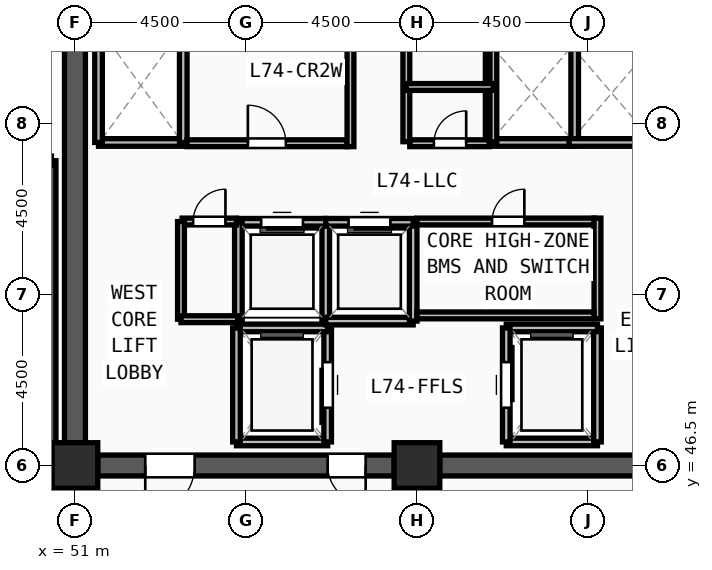
"""IFC4 building model, lengths in metres.
Left out: names, types, materials, properties, quantities, classifications, styles, units other than length and angle.
Written with IfcOpenShell. Run it as: python <this file> out.ifc"""

import sys

from ifc_helpers import new_model, si_unit, direction, frame, frame_2d, origin, origin_2d, place, context, subcontext, project, spatial, rectangle, extrude, source, transform, mapped, element, fill, save


model = new_model("IFC4")
c1 = context("Model", 3, precision=1e-05, world=origin(), true_north=direction((0.0, 1.0)))
c2 = subcontext(c1, "Body", "Model", "MODEL_VIEW")
j1 = project(units=[si_unit("LENGTHUNIT", "METRE"), si_unit("PLANEANGLEUNIT", "RADIAN")], contexts=[c1])
p1 = place(None, origin())
s1 = spatial("IfcSite", under=j1, at=p1, CompositionType="ELEMENT")
p2 = place(p1, origin())
s2 = spatial("IfcBuilding", under=s1, at=p2, CompositionType="ELEMENT")
p3 = place(p2, frame((0.0, 0.0, 286.5)))
s3 = spatial("IfcBuildingStorey", under=s2, at=p3, CompositionType="ELEMENT", Elevation=286.5)
m1 = source(origin(), c2, "Body", "SweptSolid", [
    extrude(rectangle(XDim=1.2, YDim=1.2, at=origin_2d()), origin(), (0.0, 0.0, 1.0), 3.75),
])
for number, where, z_axis, x_axis in (
    (1, (51.0, 46.5, 0.0), (0.0, 0.0, 1.0), (1.0, 0.0, 0.0)),
    (2, (60.0, 46.5, 0.0), (0.0, 0.0, 1.0), (1.0, 0.0, 0.0)),
):
    element("IfcColumn", number, at=place(p3, frame(where, z_axis=z_axis, x_axis=x_axis)), inside=s3, PredefinedType="COLUMN", context=c2, shape_type="MappedRepresentation", body=[
        mapped(m1, transform((0.0, 0.0, 0.0), x_axis=(1.0, 0.0, 0.0), y_axis=(0.0, 1.0, 0.0), z_axis=(0.0, 0.0, 1.0), scale=1.0)),
    ])
p4 = place(p3, frame((68.4, 46.5, 0.0), z_axis=(0.0, 0.0, 1.0), x_axis=(-1.0, 0.0, 0.0)))
e3 = element("IfcWall", 3, at=p4, inside=s3, PredefinedType="SHEAR", context=c2, shape_type="SweptSolid", body=[
    extrude(rectangle(XDim=7.8, YDim=0.55, at=frame_2d((3.9, 0.0))), origin(), (0.0, 0.0, 1.0), 3.57),
])
m2 = source(origin(), c2, "Body", "SweptSolid", [
    extrude(rectangle(XDim=1.3, YDim=2.2, at=frame_2d((0.65, 1.1))), frame((0.0, 0.285, 0.0), z_axis=(0.0, -1.0, 0.0), x_axis=(1.0, 0.0, 0.0)), (0.0, 0.0, 1.0), 0.57),
])
p5 = place(p4, frame((1.25, 0.0, 0.0)))
e4 = element("IfcOpeningElement", 4, at=p5, cuts=e3, PredefinedType="OPENING", context=c2, shape_type="MappedRepresentation", body=[
    mapped(m2, transform((0.0, 0.0, 0.0), x_axis=(1.0, 0.0, 0.0), y_axis=(0.0, 1.0, 0.0), z_axis=(0.0, 0.0, 1.0), scale=1.0)),
])
p6 = place(p3, frame((59.4, 46.5, 0.0), z_axis=(0.0, 0.0, 1.0), x_axis=(-1.0, 0.0, 0.0)))
e5 = element("IfcWall", 5, at=p6, inside=s3, PredefinedType="SHEAR", context=c2, shape_type="SweptSolid", body=[
    extrude(rectangle(XDim=7.8, YDim=0.55, at=frame_2d((3.9, 0.0))), origin(), (0.0, 0.0, 1.0), 3.57),
])
p7 = place(p6, frame((5.25, 0.0, 0.0)))
e6 = element("IfcOpeningElement", 6, at=p7, cuts=e5, PredefinedType="OPENING", context=c2, shape_type="MappedRepresentation", body=[
    mapped(m2, transform((0.0, 0.0, 0.0), x_axis=(1.0, 0.0, 0.0), y_axis=(0.0, 1.0, 0.0), z_axis=(0.0, 0.0, 1.0), scale=1.0)),
])
m3 = source(origin(), c2, "Body", "SweptSolid", [
    extrude(rectangle(XDim=1.0, YDim=2.2, at=frame_2d((0.5, 1.1))), frame((0.0, 0.285, 0.0), z_axis=(0.0, -1.0, 0.0), x_axis=(1.0, 0.0, 0.0)), (0.0, 0.0, 1.0), 0.57),
])
p8 = place(p6, frame((0.75, 0.0, 0.0)))
e7 = element("IfcOpeningElement", 7, at=p8, cuts=e5, PredefinedType="OPENING", context=c2, shape_type="MappedRepresentation", body=[
    mapped(m3, transform((0.0, 0.0, 0.0), x_axis=(1.0, 0.0, 0.0), y_axis=(0.0, 1.0, 0.0), z_axis=(0.0, 0.0, 1.0), scale=1.0)),
])
p9 = place(p3, frame((51.0, 47.1, 0.0), z_axis=(0.0, 0.0, 1.0), x_axis=(0.0, 1.0, 0.0)))
e8 = element("IfcWall", 8, at=p9, inside=s3, PredefinedType="SHEAR", context=c2, shape_type="SweptSolid", body=[
    extrude(rectangle(XDim=13.8, YDim=0.55, at=frame_2d((6.9, 0.0))), origin(), (0.0, 0.0, 1.0), 3.57),
])
p10 = place(p3, frame((50.38, 46.7, 0.0), z_axis=(0.0, 0.0, 1.0), x_axis=(0.0, 1.0, 0.0)))
e9 = element("IfcWall", 9, at=p10, inside=s3, PredefinedType="SOLIDWALL", context=c2, shape_type="SweptSolid", body=[
    extrude(rectangle(XDim=7.82, YDim=0.24, at=frame_2d((3.91, 0.0))), origin(), (0.0, 0.0, 1.0), 3.57),
])
p11 = place(p3, frame((55.25, 47.12, 0.0), z_axis=(0.0, 0.0, 1.0), x_axis=(1.0, 0.0, 0.0)))
e10 = element("IfcWall", 10, at=p11, inside=s3, PredefinedType="SOLIDWALL", context=c2, shape_type="SweptSolid", body=[
    extrude(rectangle(XDim=2.4, YDim=0.2, at=frame_2d((1.2, 0.0))), origin(), (0.0, 0.0, 1.0), 3.57),
])
p12 = place(p3, frame((57.65, 47.12, 0.0), z_axis=(0.0, 0.0, 1.0), x_axis=(0.0, 1.0, 0.0)))
e11 = element("IfcWall", 11, at=p12, inside=s3, PredefinedType="SOLIDWALL", context=c2, shape_type="SweptSolid", body=[
    extrude(rectangle(XDim=3.0, YDim=0.2, at=frame_2d((1.5, 0.0))), origin(), (0.0, 0.0, 1.0), 3.57),
])
m4 = source(origin(), c2, "Body", "SweptSolid", [
    extrude(rectangle(XDim=1.2, YDim=2.3, at=frame_2d((0.6, 1.15))), frame((0.0, 0.11, 0.0), z_axis=(0.0, -1.0, 0.0), x_axis=(1.0, 0.0, 0.0)), (0.0, 0.0, 1.0), 0.22),
])
p13 = place(p12, frame((0.9, 0.0, 0.0)))
e12 = element("IfcOpeningElement", 12, at=p13, cuts=e11, PredefinedType="OPENING", context=c2, shape_type="MappedRepresentation", body=[
    mapped(m4, transform((0.0, 0.0, 0.0), x_axis=(1.0, 0.0, 0.0), y_axis=(0.0, 1.0, 0.0), z_axis=(0.0, 0.0, 1.0), scale=1.0)),
])
p14 = place(p3, frame((57.65, 50.12, 0.0), z_axis=(0.0, 0.0, 1.0), x_axis=(-1.0, 0.0, 0.0)))
e13 = element("IfcWall", 13, at=p14, inside=s3, PredefinedType="SOLIDWALL", context=c2, shape_type="SweptSolid", body=[
    extrude(rectangle(XDim=2.4, YDim=0.2, at=frame_2d((1.2, 0.0))), origin(), (0.0, 0.0, 1.0), 3.57),
])
p15 = place(p3, frame((55.25, 50.12, 0.0), z_axis=(0.0, 0.0, 1.0), x_axis=(0.0, -1.0, 0.0)))
e14 = element("IfcWall", 14, at=p15, inside=s3, PredefinedType="SOLIDWALL", context=c2, shape_type="SweptSolid", body=[
    extrude(rectangle(XDim=3.0, YDim=0.2, at=frame_2d((1.5, 0.0))), origin(), (0.0, 0.0, 1.0), 3.57),
])
p16 = place(p3, frame((62.35, 47.12, 0.0), z_axis=(0.0, 0.0, 1.0), x_axis=(1.0, 0.0, 0.0)))
e15 = element("IfcWall", 15, at=p16, inside=s3, PredefinedType="SOLIDWALL", context=c2, shape_type="SweptSolid", body=[
    extrude(rectangle(XDim=2.4, YDim=0.2, at=frame_2d((1.2, 0.0))), origin(), (0.0, 0.0, 1.0), 3.57),
])
p17 = place(p3, frame((64.75, 47.12, 0.0), z_axis=(0.0, 0.0, 1.0), x_axis=(0.0, 1.0, 0.0)))
e16 = element("IfcWall", 16, at=p17, inside=s3, PredefinedType="SOLIDWALL", context=c2, shape_type="SweptSolid", body=[
    extrude(rectangle(XDim=3.0, YDim=0.2, at=frame_2d((1.5, 0.0))), origin(), (0.0, 0.0, 1.0), 3.57),
])
p18 = place(p3, frame((64.75, 50.12, 0.0), z_axis=(0.0, 0.0, 1.0), x_axis=(-1.0, 0.0, 0.0)))
e17 = element("IfcWall", 17, at=p18, inside=s3, PredefinedType="SOLIDWALL", context=c2, shape_type="SweptSolid", body=[
    extrude(rectangle(XDim=2.4, YDim=0.2, at=frame_2d((1.2, 0.0))), origin(), (0.0, 0.0, 1.0), 3.57),
])
p19 = place(p3, frame((62.35, 50.12, 0.0), z_axis=(0.0, 0.0, 1.0), x_axis=(0.0, -1.0, 0.0)))
e18 = element("IfcWall", 18, at=p19, inside=s3, PredefinedType="SOLIDWALL", context=c2, shape_type="SweptSolid", body=[
    extrude(rectangle(XDim=3.0, YDim=0.2, at=frame_2d((1.5, 0.0))), origin(), (0.0, 0.0, 1.0), 3.57),
])
p20 = place(p19, frame((0.9, 0.0, 0.0)))
e19 = element("IfcOpeningElement", 19, at=p20, cuts=e18, PredefinedType="OPENING", context=c2, shape_type="MappedRepresentation", body=[
    mapped(m4, transform((0.0, 0.0, 0.0), x_axis=(1.0, 0.0, 0.0), y_axis=(0.0, 1.0, 0.0), z_axis=(0.0, 0.0, 1.0), scale=1.0)),
])
p21 = place(p3, frame((51.62, 55.0, 0.0), z_axis=(0.0, 0.0, 1.0), x_axis=(1.0, 0.0, 0.0)))
e20 = element("IfcWall", 20, at=p21, inside=s3, PredefinedType="SOLIDWALL", context=c2, shape_type="SweptSolid", body=[
    extrude(rectangle(XDim=2.23, YDim=0.2, at=frame_2d((1.115, 0.0))), origin(), (0.0, 0.0, 1.0), 3.57),
])
for number, where, z_axis, x_axis in (
    (21, (53.85, 55.0, 0.0), (0.0, 0.0, 1.0), (0.0, 1.0, 0.0)),
    (22, (51.62, 58.0, 0.0), (0.0, 0.0, 1.0), (0.0, -1.0, 0.0)),
):
    element("IfcWall", number, at=place(p3, frame(where, z_axis=z_axis, x_axis=x_axis)), inside=s3, PredefinedType="SOLIDWALL", context=c2, shape_type="SweptSolid", body=[
        extrude(rectangle(XDim=3.0, YDim=0.2, at=frame_2d((1.5, 0.0))), origin(), (0.0, 0.0, 1.0), 3.57),
    ])
p22 = place(p3, frame((61.9, 55.0, 0.0), z_axis=(0.0, 0.0, 1.0), x_axis=(1.0, 0.0, 0.0)))
e23 = element("IfcWall", 23, at=p22, inside=s3, PredefinedType="SOLIDWALL", context=c2, shape_type="SweptSolid", body=[
    extrude(rectangle(XDim=2.25, YDim=0.2, at=frame_2d((1.125, 0.0))), origin(), (0.0, 0.0, 1.0), 3.57),
])
for number, where, z_axis, x_axis in (
    (24, (64.15, 55.0, 0.0), (0.0, 0.0, 1.0), (0.0, 1.0, 0.0)),
    (25, (61.9, 57.6, 0.0), (0.0, 0.0, 1.0), (0.0, -1.0, 0.0)),
):
    element("IfcWall", number, at=place(p3, frame(where, z_axis=z_axis, x_axis=x_axis)), inside=s3, PredefinedType="SOLIDWALL", context=c2, shape_type="SweptSolid", body=[
        extrude(rectangle(XDim=2.6, YDim=0.2, at=frame_2d((1.3, 0.0))), origin(), (0.0, 0.0, 1.0), 3.57),
    ])
p23 = place(p3, frame((64.0, 55.0, 0.0), z_axis=(0.0, 0.0, 1.0), x_axis=(1.0, 0.0, 0.0)))
e26 = element("IfcWall", 26, at=p23, inside=s3, PredefinedType="SOLIDWALL", context=c2, shape_type="SweptSolid", body=[
    extrude(rectangle(XDim=2.25, YDim=0.2, at=frame_2d((1.125, 0.0))), origin(), (0.0, 0.0, 1.0), 3.57),
])
p24 = place(p3, frame((57.6, 50.3, 0.0), z_axis=(0.0, 0.0, 1.0), x_axis=(0.0, 1.0, 0.0)))
e27 = element("IfcWall", 27, at=p24, inside=s3, PredefinedType="SOLIDWALL", context=c2, shape_type="SweptSolid", body=[
    extrude(rectangle(XDim=2.6, YDim=0.2, at=frame_2d((1.3, 0.0))), origin(), (0.0, 0.0, 1.0), 3.57),
])
p25 = place(p3, frame((57.6, 52.9, 0.0), z_axis=(0.0, 0.0, 1.0), x_axis=(-1.0, 0.0, 0.0)))
e28 = element("IfcWall", 28, at=p25, inside=s3, PredefinedType="SOLIDWALL", context=c2, shape_type="SweptSolid", body=[
    extrude(rectangle(XDim=2.3, YDim=0.2, at=frame_2d((1.15, 0.0))), origin(), (0.0, 0.0, 1.0), 3.57),
])
m5 = source(origin(), c2, "Body", "SweptSolid", [
    extrude(rectangle(XDim=1.1, YDim=2.2, at=frame_2d((0.55, 1.1))), frame((0.0, 0.11, 0.0), z_axis=(0.0, -1.0, 0.0), x_axis=(1.0, 0.0, 0.0)), (0.0, 0.0, 1.0), 0.22),
])
p26 = place(p25, frame((0.6, 0.0, 0.0)))
e29 = element("IfcOpeningElement", 29, at=p26, cuts=e28, PredefinedType="OPENING", context=c2, shape_type="MappedRepresentation", body=[
    mapped(m5, transform((0.0, 0.0, 0.0), x_axis=(1.0, 0.0, 0.0), y_axis=(0.0, 1.0, 0.0), z_axis=(0.0, 0.0, 1.0), scale=1.0)),
])
p27 = place(p3, frame((55.3, 52.9, 0.0), z_axis=(0.0, 0.0, 1.0), x_axis=(0.0, -1.0, 0.0)))
e30 = element("IfcWall", 30, at=p27, inside=s3, PredefinedType="SOLIDWALL", context=c2, shape_type="SweptSolid", body=[
    extrude(rectangle(XDim=2.6, YDim=0.2, at=frame_2d((1.3, 0.0))), origin(), (0.0, 0.0, 1.0), 3.57),
])
p28 = place(p3, frame((57.6, 50.3, 0.0), z_axis=(0.0, 0.0, 1.0), x_axis=(1.0, 0.0, 0.0)))
e31 = element("IfcWall", 31, at=p28, inside=s3, PredefinedType="SOLIDWALL", context=c2, shape_type="SweptSolid", body=[
    extrude(rectangle(XDim=2.3, YDim=0.2, at=frame_2d((1.15, 0.0))), origin(), (0.0, 0.0, 1.0), 3.57),
])
p29 = place(p3, frame((59.9, 50.3, 0.0), z_axis=(0.0, 0.0, 1.0), x_axis=(0.0, 1.0, 0.0)))
e32 = element("IfcWall", 32, at=p29, inside=s3, PredefinedType="SOLIDWALL", context=c2, shape_type="SweptSolid", body=[
    extrude(rectangle(XDim=2.6, YDim=0.2, at=frame_2d((1.3, 0.0))), origin(), (0.0, 0.0, 1.0), 3.57),
])
p30 = place(p3, frame((59.9, 52.9, 0.0), z_axis=(0.0, 0.0, 1.0), x_axis=(-1.0, 0.0, 0.0)))
e33 = element("IfcWall", 33, at=p30, inside=s3, PredefinedType="SOLIDWALL", context=c2, shape_type="SweptSolid", body=[
    extrude(rectangle(XDim=2.3, YDim=0.2, at=frame_2d((1.15, 0.0))), origin(), (0.0, 0.0, 1.0), 3.57),
])
p31 = place(p30, frame((0.6, 0.0, 0.0)))
e34 = element("IfcOpeningElement", 34, at=p31, cuts=e33, PredefinedType="OPENING", context=c2, shape_type="MappedRepresentation", body=[
    mapped(m5, transform((0.0, 0.0, 0.0), x_axis=(1.0, 0.0, 0.0), y_axis=(0.0, 1.0, 0.0), z_axis=(0.0, 0.0, 1.0), scale=1.0)),
])
p32 = place(p3, frame((60.0, 52.92, 0.0), z_axis=(0.0, 0.0, 1.0), x_axis=(1.0, 0.0, 0.0)))
e35 = element("IfcWall", 35, at=p32, inside=s3, PredefinedType="PARTITIONING", context=c2, shape_type="SweptSolid", body=[
    extrude(rectangle(XDim=4.66, YDim=0.18, at=frame_2d((2.33, 0.0))), origin(), (0.0, 0.0, 1.0), 3.57),
])
m6 = source(origin(), c2, "Body", "SweptSolid", [
    extrude(rectangle(XDim=0.85, YDim=2.1, at=frame_2d((0.425, 1.05))), frame((0.0, 0.1, 0.0), z_axis=(0.0, -1.0, 0.0), x_axis=(1.0, 0.0, 0.0)), (0.0, 0.0, 1.0), 0.2),
])
p33 = place(p32, frame((1.975, 0.0, 0.0)))
e36 = element("IfcOpeningElement", 36, at=p33, cuts=e35, PredefinedType="OPENING", context=c2, shape_type="MappedRepresentation", body=[
    mapped(m6, transform((0.0, 0.0, 0.0), x_axis=(1.0, 0.0, 0.0), y_axis=(0.0, 1.0, 0.0), z_axis=(0.0, 0.0, 1.0), scale=1.0)),
])
p34 = place(p3, frame((53.95, 54.98, 0.0), z_axis=(0.0, 0.0, 1.0), x_axis=(1.0, 0.0, 0.0)))
e37 = element("IfcWall", 37, at=p34, inside=s3, PredefinedType="PARTITIONING", context=c2, shape_type="SweptSolid", body=[
    extrude(rectangle(XDim=4.21, YDim=0.18, at=frame_2d((2.105, 0.0))), origin(), (0.0, 0.0, 1.0), 3.57),
])
m7 = source(origin(), c2, "Body", "SweptSolid", [
    extrude(rectangle(XDim=1.0, YDim=2.2, at=frame_2d((0.5, 1.1))), frame((0.0, 0.1, 0.0), z_axis=(0.0, -1.0, 0.0), x_axis=(1.0, 0.0, 0.0)), (0.0, 0.0, 1.0), 0.2),
])
p35 = place(p34, frame((1.6, 0.0, 0.0)))
e38 = element("IfcOpeningElement", 38, at=p35, cuts=e37, PredefinedType="OPENING", context=c2, shape_type="MappedRepresentation", body=[
    mapped(m7, transform((0.0, 0.0, 0.0), x_axis=(1.0, 0.0, 0.0), y_axis=(0.0, 1.0, 0.0), z_axis=(0.0, 0.0, 1.0), scale=1.0)),
])
p36 = place(p3, frame((59.81, 54.98, 0.0), z_axis=(0.0, 0.0, 1.0), x_axis=(1.0, 0.0, 0.0)))
e39 = element("IfcWall", 39, at=p36, inside=s3, PredefinedType="PARTITIONING", context=c2, shape_type="SweptSolid", body=[
    extrude(rectangle(XDim=2.09, YDim=0.18, at=frame_2d((1.045, 0.0))), origin(), (0.0, 0.0, 1.0), 3.57),
])
p37 = place(p36, frame((0.635, 0.0, 0.0)))
e40 = element("IfcOpeningElement", 40, at=p37, cuts=e39, PredefinedType="OPENING", context=c2, shape_type="MappedRepresentation", body=[
    mapped(m6, transform((0.0, 0.0, 0.0), x_axis=(1.0, 0.0, 0.0), y_axis=(0.0, 1.0, 0.0), z_axis=(0.0, 0.0, 1.0), scale=1.0)),
])
p38 = place(p3, frame((53.82, 52.92, 0.0), z_axis=(0.0, 0.0, 1.0), x_axis=(1.0, 0.0, 0.0)))
e41 = element("IfcWall", 41, at=p38, inside=s3, PredefinedType="PARTITIONING", context=c2, shape_type="SweptSolid", body=[
    extrude(rectangle(XDim=1.43, YDim=0.18, at=frame_2d((0.715, 0.0))), origin(), (0.0, 0.0, 1.0), 3.57),
])
p39 = place(p38, frame((0.29, 0.0, 0.0)))
e42 = element("IfcOpeningElement", 42, at=p39, cuts=e41, PredefinedType="OPENING", context=c2, shape_type="MappedRepresentation", body=[
    mapped(m6, transform((0.0, 0.0, 0.0), x_axis=(1.0, 0.0, 0.0), y_axis=(0.0, 1.0, 0.0), z_axis=(0.0, 0.0, 1.0), scale=1.0)),
])
for number, where, z_axis, x_axis in (
    (43, (59.72, 55.02, 0.0), (0.0, 0.0, 1.0), (0.0, 1.0, 0.0)),
    (44, (62.01, 55.02, 0.0), (0.0, 0.0, 1.0), (0.0, 1.0, 0.0)),
):
    element("IfcWall", number, at=place(p3, frame(where, z_axis=z_axis, x_axis=x_axis)), inside=s3, PredefinedType="PARTITIONING", context=c2, shape_type="SweptSolid", body=[
        extrude(rectangle(XDim=2.88, YDim=0.18, at=frame_2d((1.44, 0.0))), origin(), (0.0, 0.0, 1.0), 3.57),
    ])
p40 = place(p3, frame((59.72, 56.46, 0.0), z_axis=(0.0, 0.0, 1.0), x_axis=(1.0, 0.0, 0.0)))
e45 = element("IfcWall", 45, at=p40, inside=s3, PredefinedType="PARTITIONING", context=c2, shape_type="SweptSolid", body=[
    extrude(rectangle(XDim=2.29, YDim=0.18, at=frame_2d((1.145, 0.0))), origin(), (0.0, 0.0, 1.0), 3.57),
])
p41 = place(p3, frame((53.79, 50.35, 0.0), z_axis=(0.0, 0.0, 1.0), x_axis=(0.0, 1.0, 0.0)))
e46 = element("IfcWall", 46, at=p41, inside=s3, PredefinedType="PARTITIONING", context=c2, shape_type="SweptSolid", body=[
    extrude(rectangle(XDim=2.57, YDim=0.18, at=frame_2d((1.285, 0.0))), origin(), (0.0, 0.0, 1.0), 3.57),
])
p42 = place(p3, frame((53.79, 50.35, 0.0), z_axis=(0.0, 0.0, 1.0), x_axis=(1.0, 0.0, 0.0)))
e47 = element("IfcWall", 47, at=p42, inside=s3, PredefinedType="PARTITIONING", context=c2, shape_type="SweptSolid", body=[
    extrude(rectangle(XDim=1.49, YDim=0.18, at=frame_2d((0.745, 0.0))), origin(), (0.0, 0.0, 1.0), 3.57),
])
p43 = place(p3, frame((64.75, 50.36, 0.0), z_axis=(0.0, 0.0, 1.0), x_axis=(0.0, 1.0, 0.0)))
e48 = element("IfcWall", 48, at=p43, inside=s3, PredefinedType="PARTITIONING", context=c2, shape_type="SweptSolid", body=[
    extrude(rectangle(XDim=2.65, YDim=0.18, at=frame_2d((1.325, 0.0))), origin(), (0.0, 0.0, 1.0), 3.57),
])
p44 = place(p3, frame((60.0, 50.45, 0.0), z_axis=(0.0, 0.0, 1.0), x_axis=(1.0, 0.0, 0.0)))
e49 = element("IfcWall", 49, at=p44, inside=s3, PredefinedType="PARTITIONING", context=c2, shape_type="SweptSolid", body=[
    extrude(rectangle(XDim=4.66, YDim=0.18, at=frame_2d((2.33, 0.0))), origin(), (0.0, 0.0, 1.0), 3.57),
])
p45 = place(p3, frame((58.25, 54.89, 0.0), z_axis=(0.0, 0.0, 1.0), x_axis=(0.0, 1.0, 0.0)))
e50 = element("IfcWall", 50, at=p45, inside=s3, PredefinedType="PARTITIONING", context=c2, shape_type="SweptSolid", body=[
    extrude(rectangle(XDim=3.02, YDim=0.18, at=frame_2d((1.51, 0.0))), origin(), (0.0, 0.0, 1.0), 3.57),
])
m8 = source(origin(), c2, "Body", "SweptSolid", [
    extrude(rectangle(XDim=1.3, YDim=2.2, at=frame_2d((0.65, 1.1))), frame((0.0, 0.025, 0.0), z_axis=(0.0, -1.0, 0.0), x_axis=(1.0, 0.0, 0.0)), (0.0, 0.0, 1.0), 0.05),
])
p46 = place(p7, origin())
e51 = element("IfcDoor", 51, at=p46, inside=s3, OperationType="SINGLE_SWING_RIGHT", PredefinedType="DOOR", context=c2, shape_type="MappedRepresentation", body=[
    mapped(m8, transform((0.0, 0.0, 0.0), x_axis=(1.0, 0.0, 0.0), y_axis=(0.0, 1.0, 0.0), z_axis=(0.0, 0.0, 1.0), scale=1.0)),
])
fill(e6, e51)
m9 = source(origin(), c2, "Body", "SweptSolid", [
    extrude(rectangle(XDim=1.0, YDim=2.2, at=frame_2d((0.5, 1.1))), frame((0.0, 0.025, 0.0), z_axis=(0.0, -1.0, 0.0), x_axis=(1.0, 0.0, 0.0)), (0.0, 0.0, 1.0), 0.05),
])
p47 = place(p8, origin())
e52 = element("IfcDoor", 52, at=p47, inside=s3, OperationType="SINGLE_SWING_LEFT", PredefinedType="DOOR", context=c2, shape_type="MappedRepresentation", body=[
    mapped(m9, transform((0.0, 0.0, 0.0), x_axis=(1.0, 0.0, 0.0), y_axis=(0.0, 1.0, 0.0), z_axis=(0.0, 0.0, 1.0), scale=1.0)),
])
fill(e7, e52)
m10 = source(origin(), c2, "Body", "SweptSolid", [
    extrude(rectangle(XDim=1.2, YDim=2.3, at=frame_2d((0.6, 1.15))), frame((0.0, 0.025, 0.0), z_axis=(0.0, -1.0, 0.0), x_axis=(1.0, 0.0, 0.0)), (0.0, 0.0, 1.0), 0.05),
])
p48 = place(p13, origin())
e53 = element("IfcDoor", 53, at=p48, inside=s3, OperationType="SLIDING_TO_LEFT", PredefinedType="DOOR", context=c2, shape_type="MappedRepresentation", body=[
    mapped(m10, transform((0.0, 0.0, 0.0), x_axis=(1.0, 0.0, 0.0), y_axis=(0.0, 1.0, 0.0), z_axis=(0.0, 0.0, 1.0), scale=1.0)),
])
fill(e12, e53)
p49 = place(p20, origin())
e54 = element("IfcDoor", 54, at=p49, inside=s3, OperationType="SLIDING_TO_LEFT", PredefinedType="DOOR", context=c2, shape_type="MappedRepresentation", body=[
    mapped(m10, transform((0.0, 0.0, 0.0), x_axis=(1.0, 0.0, 0.0), y_axis=(0.0, 1.0, 0.0), z_axis=(0.0, 0.0, 1.0), scale=1.0)),
])
fill(e19, e54)
m11 = source(origin(), c2, "Body", "SweptSolid", [
    extrude(rectangle(XDim=1.1, YDim=2.2, at=frame_2d((0.55, 1.1))), frame((0.0, 0.025, 0.0), z_axis=(0.0, -1.0, 0.0), x_axis=(1.0, 0.0, 0.0)), (0.0, 0.0, 1.0), 0.05),
])
p50 = place(p26, origin())
e55 = element("IfcDoor", 55, at=p50, inside=s3, OperationType="SLIDING_TO_LEFT", PredefinedType="DOOR", context=c2, shape_type="MappedRepresentation", body=[
    mapped(m11, transform((0.0, 0.0, 0.0), x_axis=(1.0, 0.0, 0.0), y_axis=(0.0, 1.0, 0.0), z_axis=(0.0, 0.0, 1.0), scale=1.0)),
])
fill(e29, e55)
p51 = place(p31, origin())
e56 = element("IfcDoor", 56, at=p51, inside=s3, OperationType="SLIDING_TO_LEFT", PredefinedType="DOOR", context=c2, shape_type="MappedRepresentation", body=[
    mapped(m11, transform((0.0, 0.0, 0.0), x_axis=(1.0, 0.0, 0.0), y_axis=(0.0, 1.0, 0.0), z_axis=(0.0, 0.0, 1.0), scale=1.0)),
])
fill(e34, e56)
m12 = source(origin(), c2, "Body", "SweptSolid", [
    extrude(rectangle(XDim=0.85, YDim=2.1, at=frame_2d((0.425, 1.05))), frame((0.0, 0.025, 0.0), z_axis=(0.0, -1.0, 0.0), x_axis=(1.0, 0.0, 0.0)), (0.0, 0.0, 1.0), 0.05),
])
p52 = place(p33, origin())
e57 = element("IfcDoor", 57, at=p52, inside=s3, OperationType="SINGLE_SWING_RIGHT", PredefinedType="DOOR", context=c2, shape_type="MappedRepresentation", body=[
    mapped(m12, transform((0.0, 0.0, 0.0), x_axis=(1.0, 0.0, 0.0), y_axis=(0.0, 1.0, 0.0), z_axis=(0.0, 0.0, 1.0), scale=1.0)),
])
fill(e36, e57)
p53 = place(p35, origin())
e58 = element("IfcDoor", 58, at=p53, inside=s3, OperationType="SINGLE_SWING_LEFT", PredefinedType="DOOR", context=c2, shape_type="MappedRepresentation", body=[
    mapped(m9, transform((0.0, 0.0, 0.0), x_axis=(1.0, 0.0, 0.0), y_axis=(0.0, 1.0, 0.0), z_axis=(0.0, 0.0, 1.0), scale=1.0)),
])
fill(e38, e58)
p54 = place(p37, origin())
e59 = element("IfcDoor", 59, at=p54, inside=s3, OperationType="SINGLE_SWING_RIGHT", PredefinedType="DOOR", context=c2, shape_type="MappedRepresentation", body=[
    mapped(m12, transform((0.0, 0.0, 0.0), x_axis=(1.0, 0.0, 0.0), y_axis=(0.0, 1.0, 0.0), z_axis=(0.0, 0.0, 1.0), scale=1.0)),
])
fill(e40, e59)
p55 = place(p39, origin())
e60 = element("IfcDoor", 60, at=p55, inside=s3, OperationType="SINGLE_SWING_RIGHT", PredefinedType="DOOR", context=c2, shape_type="MappedRepresentation", body=[
    mapped(m12, transform((0.0, 0.0, 0.0), x_axis=(1.0, 0.0, 0.0), y_axis=(0.0, 1.0, 0.0), z_axis=(0.0, 0.0, 1.0), scale=1.0)),
])
fill(e42, e60)
save(model, sys.argv[1])
